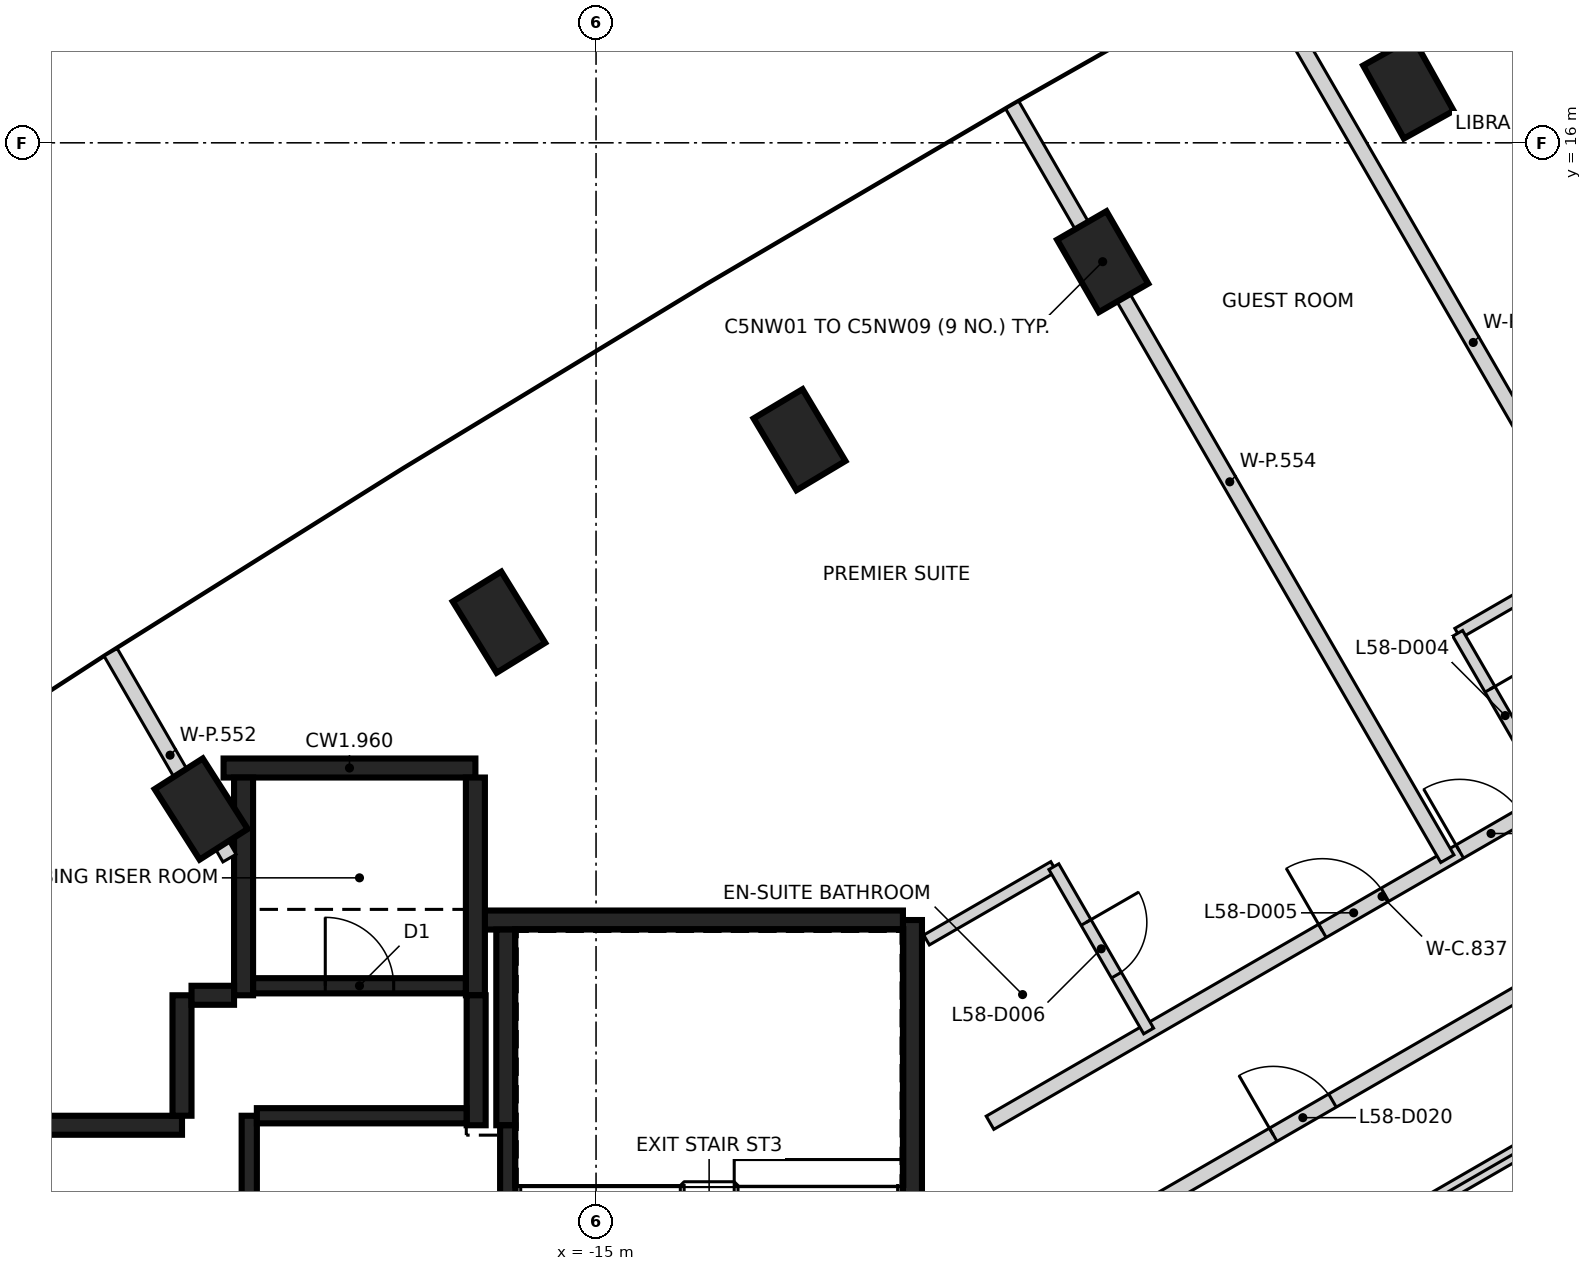
"""IFC4 building model, lengths in metres.
Left out: names, types, materials, properties, quantities, classifications, styles, units other than length and angle.
Written with IfcOpenShell. Run it as: python <this file> out.ifc"""

import sys

from ifc_helpers import new_model, si_unit, direction, frame, frame_2d, origin, origin_2d, place, context, subcontext, project, spatial, rectangle, extrude, element, fill, save


model = new_model("IFC4")
c1 = context("Model", 3, precision=1e-05, world=origin(), true_north=direction((0.0, 1.0)))
c2 = subcontext(c1, "Body", "Model", "MODEL_VIEW")
j1 = project(units=[si_unit("LENGTHUNIT", "METRE"), si_unit("PLANEANGLEUNIT", "RADIAN")], contexts=[c1])
p1 = place(None, origin())
s1 = spatial("IfcSite", under=j1, at=p1, CompositionType="ELEMENT")
p2 = place(p1, origin())
s2 = spatial("IfcBuilding", under=s1, at=p2, CompositionType="ELEMENT")
p3 = place(p2, frame((0.0, 0.0, 232.2)))
s3 = spatial("IfcBuildingStorey", under=s2, at=p3, CompositionType="ELEMENT", Elevation=232.2)
for number, where, z_axis, x_axis in (
    (1, (-4.312, 16.719, -0.35), (0.0, 0.0, 1.0), (-0.487, 0.873, 0.0)),
    (2, (-8.335, 14.436, -0.35), (0.0, 0.0, 1.0), (-0.5, 0.866, 0.0)),
    (3, (-12.323, 12.094, -0.35), (0.0, 0.0, 1.0), (-0.513, 0.858, 0.0)),
    (4, (-16.277, 9.693, -0.35), (0.0, 0.0, 1.0), (-0.525, 0.851, 0.0)),
    (5, (-20.195, 7.235, -0.35), (0.0, 0.0, 1.0), (-0.538, 0.843, 0.0)),
):
    element("IfcColumn", number, at=place(p3, frame(where, z_axis=z_axis, x_axis=x_axis)), inside=s3, PredefinedType="COLUMN", context=c2, shape_type="SweptSolid", body=[
        extrude(rectangle(XDim=1.1, YDim=0.75, at=origin_2d()), origin(), (0.0, 0.0, 1.0), 3.6),
    ])
p4 = place(p3, frame((-10.837, 5.775, 0.0), z_axis=(0.0, 0.0, 1.0), x_axis=(0.0, -1.0, 0.0)))
e6 = element("IfcWall", 6, at=p4, inside=s3, PredefinedType="SHEAR", context=c2, shape_type="SweptSolid", body=[
    extrude(rectangle(XDim=11.55, YDim=0.25, at=frame_2d((5.775, 0.0))), origin(), (0.0, 0.0, 1.0), 3.25),
])
p5 = place(p4, frame((10.025, 0.0, 0.0)))
e7 = element("IfcOpeningElement", 7, at=p5, cuts=e6, PredefinedType="OPENING", context=c2, shape_type="SweptSolid", body=[
    extrude(rectangle(XDim=1.2, YDim=2.1, at=frame_2d((0.6, 1.05))), frame((0.0, 0.135, 0.0), z_axis=(0.0, -1.0, 0.0), x_axis=(1.0, 0.0, 0.0)), (0.0, 0.0, 1.0), 0.27),
])
p6 = place(p4, frame((8.725, 0.0, 0.0)))
e8 = element("IfcOpeningElement", 8, at=p6, cuts=e6, PredefinedType="OPENING", context=c2, shape_type="SweptSolid", body=[
    extrude(rectangle(XDim=1.2, YDim=2.1, at=frame_2d((0.6, 1.05))), frame((0.0, 0.135, 0.0), z_axis=(0.0, -1.0, 0.0), x_axis=(1.0, 0.0, 0.0)), (0.0, 0.0, 1.0), 0.27),
])
p7 = place(p3, frame((-16.472, 5.775, 0.0), z_axis=(0.0, 0.0, 1.0), x_axis=(1.0, 0.0, 0.0)))
e9 = element("IfcWall", 9, at=p7, inside=s3, PredefinedType="SHEAR", context=c2, shape_type="SweptSolid", body=[
    extrude(rectangle(XDim=5.51, YDim=0.25, at=frame_2d((2.755, 0.0))), origin(), (0.0, 0.0, 1.0), 3.25),
])
p8 = place(p3, frame((-19.9, 7.775, 0.0), z_axis=(0.0, 0.0, 1.0), x_axis=(1.0, 0.0, 0.0)))
e10 = element("IfcWall", 10, at=p8, inside=s3, PredefinedType="SHEAR", context=c2, shape_type="SweptSolid", body=[
    extrude(rectangle(XDim=3.313, YDim=0.25, at=frame_2d((1.656, 0.0))), origin(), (0.0, 0.0, 1.0), 3.25),
])
for number, where, z_axis, x_axis in (
    (11, (-16.587, 7.65, 0.0), (0.0, 0.0, 1.0), (0.0, -1.0, 0.0)),
    (12, (-19.637, 4.785, 0.0), (0.0, 0.0, 1.0), (0.0, 1.0, 0.0)),
):
    element("IfcWall", number, at=place(p3, frame(where, z_axis=z_axis, x_axis=x_axis)), inside=s3, PredefinedType="SHEAR", context=c2, shape_type="SweptSolid", body=[
        extrude(rectangle(XDim=2.865, YDim=0.25, at=frame_2d((1.432, 0.0))), origin(), (0.0, 0.0, 1.0), 3.25),
    ])
p9 = place(p3, frame((-16.187, 3.075, 0.0), z_axis=(0.0, 0.0, 1.0), x_axis=(0.0, 1.0, 0.0)))
e13 = element("IfcWall", 13, at=p9, inside=s3, PredefinedType="SHEAR", context=c2, shape_type="SweptSolid", body=[
    extrude(rectangle(XDim=2.575, YDim=0.25, at=frame_2d((1.287, 0.0))), origin(), (0.0, 0.0, 1.0), 3.25),
])
p10 = place(p3, frame((-22.312, 3.075, 0.0), z_axis=(0.0, 0.0, 1.0), x_axis=(1.0, 0.0, 0.0)))
e14 = element("IfcWall", 14, at=p10, inside=s3, PredefinedType="SHEAR", context=c2, shape_type="SweptSolid", body=[
    extrude(rectangle(XDim=1.865, YDim=0.25, at=frame_2d((0.932, 0.0))), origin(), (0.0, 0.0, 1.0), 3.25),
])
p11 = place(p3, frame((-16.577, 4.785, 0.0), z_axis=(0.0, 0.0, 1.0), x_axis=(0.0, -1.0, 0.0)))
e15 = element("IfcWall", 15, at=p11, inside=s3, PredefinedType="SHEAR", context=c2, shape_type="SweptSolid", body=[
    extrude(rectangle(XDim=1.71, YDim=0.25, at=frame_2d((0.855, 0.0))), origin(), (0.0, 0.0, 1.0), 3.25),
])
p12 = place(p3, frame((-20.447, 3.2, 0.0), z_axis=(0.0, 0.0, 1.0), x_axis=(0.0, 1.0, 0.0)))
e16 = element("IfcWall", 16, at=p12, inside=s3, PredefinedType="SHEAR", context=c2, shape_type="SweptSolid", body=[
    extrude(rectangle(XDim=1.584, YDim=0.25, at=frame_2d((0.792, 0.0))), origin(), (0.0, 0.0, 1.0), 3.25),
])
p13 = place(p3, frame((-20.322, 4.785, 0.0), z_axis=(0.0, 0.0, 1.0), x_axis=(1.0, 0.0, 0.0)))
e17 = element("IfcWall", 17, at=p13, inside=s3, PredefinedType="SHEAR", context=c2, shape_type="SweptSolid", body=[
    extrude(rectangle(XDim=0.559, YDim=0.25, at=frame_2d((0.28, 0.0))), origin(), (0.0, 0.0, 1.0), 3.25),
])
p14 = place(p3, frame((-16.162, 3.074, 0.0), z_axis=(0.0, 0.0, 1.0), x_axis=(0.0, -1.0, 0.0)))
e18 = element("IfcWall", 18, at=p14, inside=s3, PredefinedType="SHEAR", context=c2, shape_type="SweptSolid", body=[
    extrude(rectangle(XDim=5.974, YDim=0.2, at=frame_2d((2.987, 0.0))), origin(), (0.0, 0.0, 1.0), 3.25),
])
p15 = place(p3, frame((-19.562, -2.9, 0.0), z_axis=(0.0, 0.0, 1.0), x_axis=(0.0, 1.0, 0.0)))
e19 = element("IfcWall", 19, at=p15, inside=s3, PredefinedType="SHEAR", context=c2, shape_type="SweptSolid", body=[
    extrude(rectangle(XDim=6.1, YDim=0.2, at=frame_2d((3.05, 0.0))), origin(), (0.0, 0.0, 1.0), 3.25),
])
p16 = place(p3, frame((-19.511, 4.91, 0.0), z_axis=(0.0, 0.0, 1.0), x_axis=(1.0, 0.0, 0.0)))
e20 = element("IfcWall", 20, at=p16, inside=s3, PredefinedType="SHEAR", context=c2, shape_type="SweptSolid", body=[
    extrude(rectangle(XDim=2.798, YDim=0.2, at=frame_2d((1.399, 0.0))), origin(), (0.0, 0.0, 1.0), 3.25),
])
p17 = place(p16, frame((0.949, 0.0, 0.0)))
e21 = element("IfcOpeningElement", 21, at=p17, cuts=e20, PredefinedType="OPENING", context=c2, shape_type="SweptSolid", body=[
    extrude(rectangle(XDim=0.9, YDim=2.1, at=frame_2d((0.45, 1.05))), frame((0.0, 0.11, 0.0), z_axis=(0.0, -1.0, 0.0), x_axis=(1.0, 0.0, 0.0)), (0.0, 0.0, 1.0), 0.22),
])
p18 = place(p3, frame((-19.462, 3.2, 0.0), z_axis=(0.0, 0.0, 1.0), x_axis=(1.0, 0.0, 0.0)))
e22 = element("IfcWall", 22, at=p18, inside=s3, PredefinedType="SHEAR", context=c2, shape_type="SweptSolid", body=[
    extrude(rectangle(XDim=2.759, YDim=0.2, at=frame_2d((1.379, 0.0))), origin(), (0.0, 0.0, 1.0), 3.25),
])
p19 = place(p3, frame((-9.817, 3.108, 0.0), z_axis=(0.0, 0.0, 1.0), x_axis=(0.86603471326, 0.499983875168, 0.0)))
e23 = element("IfcWall", 23, at=p19, inside=s3, PredefinedType="PARTITIONING", context=c2, shape_type="SweptSolid", body=[
    extrude(rectangle(XDim=11.911, YDim=0.2, at=frame_2d((5.955, 0.0))), origin(), (0.0, 0.0, 1.0), 3.25),
])
p20 = place(p19, frame((7.136, 0.0, 0.0)))
e24 = element("IfcOpeningElement", 24, at=p20, cuts=e23, PredefinedType="OPENING", context=c2, shape_type="SweptSolid", body=[
    extrude(rectangle(XDim=0.95, YDim=2.1, at=frame_2d((0.475, 1.05))), frame((0.0, 0.11, 0.0), z_axis=(0.0, -1.0, 0.0), x_axis=(1.0, 0.0, 0.0)), (0.0, 0.0, 1.0), 0.22),
])
p21 = place(p19, frame((5.049, 0.0, 0.0)))
e25 = element("IfcOpeningElement", 25, at=p21, cuts=e23, PredefinedType="OPENING", context=c2, shape_type="SweptSolid", body=[
    extrude(rectangle(XDim=0.95, YDim=2.1, at=frame_2d((0.475, 1.05))), frame((0.0, 0.11, 0.0), z_axis=(0.0, -1.0, 0.0), x_axis=(1.0, 0.0, 0.0)), (0.0, 0.0, 1.0), 0.22),
])
p22 = place(p3, frame((-8.612, 1.494, 0.0), z_axis=(0.0, 0.0, 1.0), x_axis=(0.8660441356, 0.49996755414, 0.0)))
e26 = element("IfcWall", 26, at=p22, inside=s3, PredefinedType="PARTITIONING", context=c2, shape_type="SweptSolid", body=[
    extrude(rectangle(XDim=13.422, YDim=0.2, at=frame_2d((6.711, 0.0))), origin(), (0.0, 0.0, 1.0), 3.25),
])
p23 = place(p22, frame((9.611, 0.0, 0.0)))
e27 = element("IfcOpeningElement", 27, at=p23, cuts=e26, PredefinedType="OPENING", context=c2, shape_type="SweptSolid", body=[
    extrude(rectangle(XDim=0.9, YDim=2.1, at=frame_2d((0.45, 1.05))), frame((0.0, 0.11, 0.0), z_axis=(0.0, -1.0, 0.0), x_axis=(1.0, 0.0, 0.0)), (0.0, 0.0, 1.0), 0.22),
])
p24 = place(p22, frame((2.911, 0.0, 0.0)))
e28 = element("IfcOpeningElement", 28, at=p24, cuts=e26, PredefinedType="OPENING", context=c2, shape_type="SweptSolid", body=[
    extrude(rectangle(XDim=0.9, YDim=2.1, at=frame_2d((0.45, 1.05))), frame((0.0, 0.11, 0.0), z_axis=(0.0, -1.0, 0.0), x_axis=(1.0, 0.0, 0.0)), (0.0, 0.0, 1.0), 0.22),
])
p25 = place(p3, frame((-21.386, 9.298, 0.0), z_axis=(0.0, 0.0, 1.0), x_axis=(0.500017489778, -0.866015305821, 0.0)))
e29 = element("IfcWall", 29, at=p25, inside=s3, PredefinedType="PARTITIONING", context=c2, shape_type="SweptSolid", body=[
    extrude(rectangle(XDim=3.128, YDim=0.2, at=frame_2d((1.564, 0.0))), origin(), (0.0, 0.0, 1.0), 3.25),
])
p26 = place(p3, frame((-9.525, 16.498, 0.0), z_axis=(0.0, 0.0, 1.0), x_axis=(0.500030684965, -0.866007687087, 0.0)))
e30 = element("IfcWall", 30, at=p26, inside=s3, PredefinedType="PARTITIONING", context=c2, shape_type="SweptSolid", body=[
    extrude(rectangle(XDim=11.45, YDim=0.2, at=frame_2d((5.725, 0.0))), origin(), (0.0, 0.0, 1.0), 3.25),
])
p27 = place(p3, frame((-6.315, 18.32, 0.0), z_axis=(0.0, 0.0, 1.0), x_axis=(0.500012296027, -0.866018304553, 0.0)))
e31 = element("IfcWall", 31, at=p27, inside=s3, PredefinedType="PARTITIONING", context=c2, shape_type="SweptSolid", body=[
    extrude(rectangle(XDim=11.423, YDim=0.2, at=frame_2d((5.711, 0.0))), origin(), (0.0, 0.0, 1.0), 2.35),
])
p28 = place(p3, frame((-6.0, 0.924, 0.0), z_axis=(0.0, 0.0, 1.0), x_axis=(0.866012967051, 0.500021540435, 0.0)))
e32 = element("IfcWall", 32, at=p28, inside=s3, PredefinedType="PARTITIONING", context=c2, shape_type="SweptSolid", body=[
    extrude(rectangle(XDim=9.468, YDim=0.2, at=frame_2d((4.734, 0.0))), origin(), (0.0, 0.0, 1.0), 3.25),
])
p29 = place(p3, frame((-10.652, 5.512, 0.0), z_axis=(0.0, 0.0, 1.0), x_axis=(0.866017156151, 0.500014285048, 0.0)))
e33 = element("IfcWall", 33, at=p29, inside=s3, PredefinedType="PARTITIONING", context=c2, shape_type="SweptSolid", body=[
    extrude(rectangle(XDim=1.931, YDim=0.15, at=frame_2d((0.966, 0.0))), origin(), (0.0, 0.0, 1.0), 3.25),
])
p30 = place(p3, frame((-8.977, 6.477, 0.0), z_axis=(0.0, 0.0, 1.0), x_axis=(0.499632127845, -0.86623769072, 0.0)))
e34 = element("IfcWall", 34, at=p30, inside=s3, PredefinedType="PARTITIONING", context=c2, shape_type="SweptSolid", body=[
    extrude(rectangle(XDim=2.496, YDim=0.15, at=frame_2d((1.248, 0.0))), origin(), (0.0, 0.0, 1.0), 3.25),
])
p31 = place(p30, frame((0.847, 0.0, 0.0)))
e35 = element("IfcOpeningElement", 35, at=p31, cuts=e34, PredefinedType="OPENING", context=c2, shape_type="SweptSolid", body=[
    extrude(rectangle(XDim=0.8, YDim=2.1, at=frame_2d((0.4, 1.05))), frame((0.0, 0.085, 0.0), z_axis=(0.0, -1.0, 0.0), x_axis=(1.0, 0.0, 0.0)), (0.0, 0.0, 1.0), 0.17),
])
p32 = place(p3, frame((-3.664, 9.547, 0.0), z_axis=(0.0, 0.0, 1.0), x_axis=(0.866049423672, 0.499958394027, 0.0)))
e36 = element("IfcWall", 36, at=p32, inside=s3, PredefinedType="PARTITIONING", context=c2, shape_type="SweptSolid", body=[
    extrude(rectangle(XDim=2.09, YDim=0.15, at=frame_2d((1.045, 0.0))), origin(), (0.0, 0.0, 1.0), 3.25),
])
p33 = place(p3, frame((-3.664, 9.547, 0.0), z_axis=(0.0, 0.0, 1.0), x_axis=(0.500004234368, -0.866022959057, 0.0)))
e37 = element("IfcWall", 37, at=p33, inside=s3, PredefinedType="PARTITIONING", context=c2, shape_type="SweptSolid", body=[
    extrude(rectangle(XDim=2.5, YDim=0.15, at=frame_2d((1.25, 0.0))), origin(), (0.0, 0.0, 1.0), 3.25),
])
p34 = place(p33, frame((0.85, 0.0, 0.0)))
e38 = element("IfcOpeningElement", 38, at=p34, cuts=e37, PredefinedType="OPENING", context=c2, shape_type="SweptSolid", body=[
    extrude(rectangle(XDim=0.8, YDim=2.1, at=frame_2d((0.4, 1.05))), frame((0.0, 0.085, 0.0), z_axis=(0.0, -1.0, 0.0), x_axis=(1.0, 0.0, 0.0)), (0.0, 0.0, 1.0), 0.17),
])
p35 = place(p17, origin())
e39 = element("IfcDoor", 39, at=p35, inside=s3, OperationType="SINGLE_SWING_LEFT", PredefinedType="DOOR", context=c2, shape_type="SweptSolid", body=[
    extrude(rectangle(XDim=0.9, YDim=2.1, at=frame_2d((0.45, 1.05))), frame((0.0, 0.025, 0.0), z_axis=(0.0, -1.0, 0.0), x_axis=(1.0, 0.0, 0.0)), (0.0, 0.0, 1.0), 0.05),
])
fill(e21, e39)
p36 = place(p20, origin())
e40 = element("IfcDoor", 40, at=p36, inside=s3, OperationType="SINGLE_SWING_LEFT", PredefinedType="DOOR", context=c2, shape_type="SweptSolid", body=[
    extrude(rectangle(XDim=0.95, YDim=2.1, at=frame_2d((0.475, 1.05))), frame((0.0, 0.025, 0.0), z_axis=(0.0, -1.0, 0.0), x_axis=(1.0, 0.0, 0.0)), (0.0, 0.0, 1.0), 0.05),
])
fill(e24, e40)
p37 = place(p34, origin())
e41 = element("IfcDoor", 41, at=p37, inside=s3, OperationType="SINGLE_SWING_LEFT", PredefinedType="DOOR", context=c2, shape_type="SweptSolid", body=[
    extrude(rectangle(XDim=0.8, YDim=2.1, at=frame_2d((0.4, 1.05))), frame((0.0, 0.025, 0.0), z_axis=(0.0, -1.0, 0.0), x_axis=(1.0, 0.0, 0.0)), (0.0, 0.0, 1.0), 0.05),
])
fill(e38, e41)
p38 = place(p21, origin())
e42 = element("IfcDoor", 42, at=p38, inside=s3, OperationType="SINGLE_SWING_LEFT", PredefinedType="DOOR", context=c2, shape_type="SweptSolid", body=[
    extrude(rectangle(XDim=0.95, YDim=2.1, at=frame_2d((0.475, 1.05))), frame((0.0, 0.025, 0.0), z_axis=(0.0, -1.0, 0.0), x_axis=(1.0, 0.0, 0.0)), (0.0, 0.0, 1.0), 0.05),
])
fill(e25, e42)
p39 = place(p31, frame((0.8, 0.0, 0.0), z_axis=(0.0, 0.0, 1.0), x_axis=(-1.0, 0.0, 0.0)))
e43 = element("IfcDoor", 43, at=p39, inside=s3, OperationType="SINGLE_SWING_LEFT", PredefinedType="DOOR", context=c2, shape_type="SweptSolid", body=[
    extrude(rectangle(XDim=0.8, YDim=2.1, at=frame_2d((0.4, 1.05))), frame((0.0, 0.025, 0.0), z_axis=(0.0, -1.0, 0.0), x_axis=(1.0, 0.0, 0.0)), (0.0, 0.0, 1.0), 0.05),
])
fill(e35, e43)
p40 = place(p24, frame((0.9, 0.0, 0.0), z_axis=(0.0, 0.0, 1.0), x_axis=(-1.0, 0.0, 0.0)))
e44 = element("IfcDoor", 44, at=p40, inside=s3, OperationType="SINGLE_SWING_LEFT", PredefinedType="DOOR", context=c2, shape_type="SweptSolid", body=[
    extrude(rectangle(XDim=0.9, YDim=2.1, at=frame_2d((0.45, 1.05))), frame((0.0, 0.025, 0.0), z_axis=(0.0, -1.0, 0.0), x_axis=(1.0, 0.0, 0.0)), (0.0, 0.0, 1.0), 0.05),
])
fill(e28, e44)
save(model, sys.argv[1])
